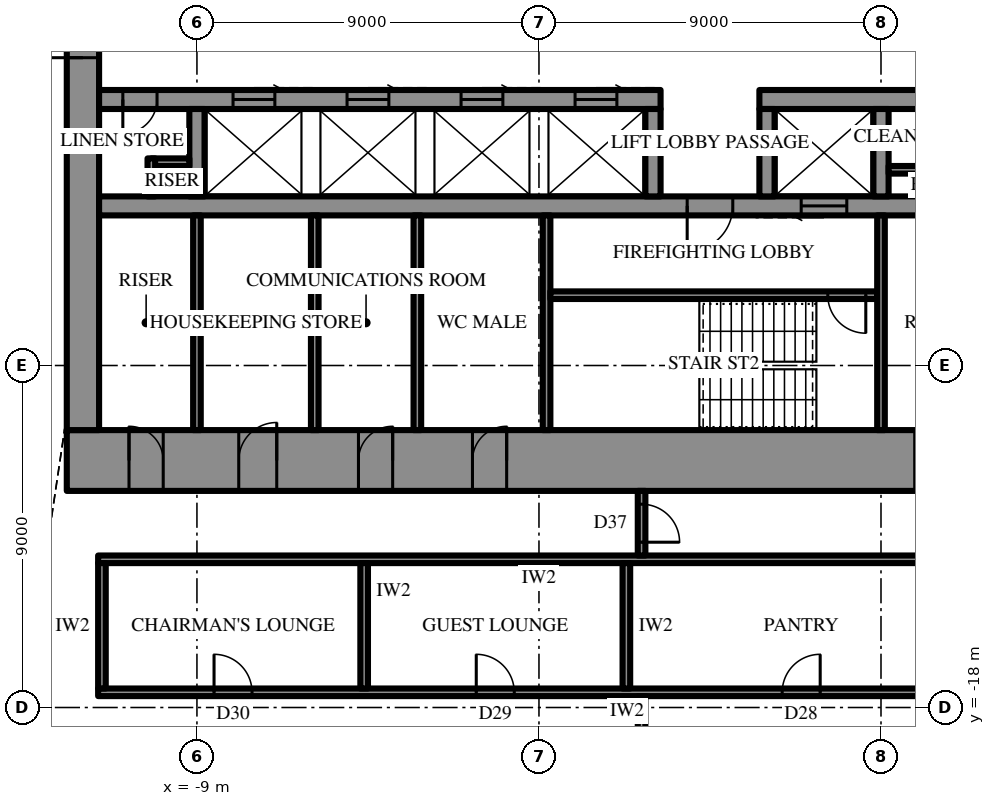
"""IFC4 building model, lengths in metres.
Left out: names, types, materials, properties, quantities, classifications, styles, units other than length and angle.
Written with IfcOpenShell. Run it as: python <this file> out.ifc"""

import sys

from ifc_helpers import new_model, si_unit, direction, frame, frame_2d, origin, place, context, subcontext, project, spatial, rectangle, extrude, element, fill, save


model = new_model("IFC4")
c1 = context("Model", 3, precision=1e-05, world=origin(), true_north=direction((0.0, 1.0)))
c2 = subcontext(c1, "Body", "Model", "MODEL_VIEW")
j1 = project(units=[si_unit("LENGTHUNIT", "METRE"), si_unit("PLANEANGLEUNIT", "RADIAN")], contexts=[c1])
p1 = place(None, origin())
s1 = spatial("IfcSite", under=j1, at=p1, CompositionType="ELEMENT")
p2 = place(p1, origin())
s2 = spatial("IfcBuilding", under=s1, at=p2, CompositionType="ELEMENT")
p3 = place(p2, frame((0.0, 0.0, 378.7)))
s3 = spatial("IfcBuildingStorey", under=s2, at=p3, CompositionType="ELEMENT", Elevation=378.7)
p4 = place(p3, frame((12.425, -11.5, 0.0), z_axis=(0.0, 0.0, 1.0), x_axis=(-1.0, 0.0, 0.0)))
e1 = element("IfcWall", 1, at=p4, inside=s3, PredefinedType="SHEAR", context=c2, shape_type="SweptSolid", body=[
    extrude(rectangle(XDim=24.85, YDim=1.6, at=frame_2d((12.425, 0.0))), origin(), (0.0, 0.0, 1.0), 4.2),
])
p5 = place(p4, frame((13.275, 0.0, 0.0)))
e2 = element("IfcOpeningElement", 2, at=p5, cuts=e1, PredefinedType="OPENING", context=c2, shape_type="SweptSolid", body=[
    extrude(rectangle(XDim=0.9, YDim=2.2, at=frame_2d((0.45, 1.1))), frame((0.0, 0.81, 0.0), z_axis=(0.0, -1.0, 0.0), x_axis=(1.0, 0.0, 0.0)), (0.0, 0.0, 1.0), 1.62),
])
p6 = place(p4, frame((16.275, 0.0, 0.0)))
e3 = element("IfcOpeningElement", 3, at=p6, cuts=e1, PredefinedType="OPENING", context=c2, shape_type="SweptSolid", body=[
    extrude(rectangle(XDim=0.9, YDim=2.2, at=frame_2d((0.45, 1.1))), frame((0.0, 0.81, 0.0), z_axis=(0.0, -1.0, 0.0), x_axis=(1.0, 0.0, 0.0)), (0.0, 0.0, 1.0), 1.62),
])
p7 = place(p4, frame((19.325, 0.0, 0.0)))
e4 = element("IfcOpeningElement", 4, at=p7, cuts=e1, PredefinedType="OPENING", context=c2, shape_type="SweptSolid", body=[
    extrude(rectangle(XDim=1.0, YDim=2.2, at=frame_2d((0.5, 1.1))), frame((0.0, 0.81, 0.0), z_axis=(0.0, -1.0, 0.0), x_axis=(1.0, 0.0, 0.0)), (0.0, 0.0, 1.0), 1.62),
])
p8 = place(p4, frame((1.637, 0.0, 0.0)))
e5 = element("IfcOpeningElement", 5, at=p8, cuts=e1, PredefinedType="OPENING", context=c2, shape_type="SweptSolid", body=[
    extrude(rectangle(XDim=0.9, YDim=2.2, at=frame_2d((0.45, 1.1))), frame((0.0, 0.81, 0.0), z_axis=(0.0, -1.0, 0.0), x_axis=(1.0, 0.0, 0.0)), (0.0, 0.0, 1.0), 1.62),
])
p9 = place(p4, frame((22.312, 0.0, 0.0)))
e6 = element("IfcOpeningElement", 6, at=p9, cuts=e1, PredefinedType="OPENING", context=c2, shape_type="SweptSolid", body=[
    extrude(rectangle(XDim=0.9, YDim=2.2, at=frame_2d((0.45, 1.1))), frame((0.0, 0.81, 0.0), z_axis=(0.0, -1.0, 0.0), x_axis=(1.0, 0.0, 0.0)), (0.0, 0.0, 1.0), 1.62),
])
p10 = place(p3, frame((-12.0, 10.7, 0.0), z_axis=(0.0, 0.0, 1.0), x_axis=(0.0, -1.0, 0.0)))
e7 = element("IfcWall", 7, at=p10, inside=s3, PredefinedType="SHEAR", context=c2, shape_type="SweptSolid", body=[
    extrude(rectangle(XDim=21.4, YDim=0.85, at=frame_2d((10.7, 0.0))), origin(), (0.0, 0.0, 1.0), 4.2),
])
p11 = place(p10, frame((9.8, 0.0, 0.0)))
e8 = element("IfcOpeningElement", 8, at=p11, cuts=e7, PredefinedType="OPENING", context=c2, shape_type="SweptSolid", body=[
    extrude(rectangle(XDim=1.8, YDim=2.4, at=frame_2d((0.9, 1.2))), frame((0.0, 0.435, 0.0), z_axis=(0.0, -1.0, 0.0), x_axis=(1.0, 0.0, 0.0)), (0.0, 0.0, 1.0), 0.87),
])
p12 = place(p3, frame((11.575, -2.0, 0.0), z_axis=(0.0, 0.0, 1.0), x_axis=(-1.0, 0.0, 0.0)))
e9 = element("IfcWall", 9, at=p12, inside=s3, PredefinedType="SHEAR", context=c2, shape_type="SweptSolid", body=[
    extrude(rectangle(XDim=5.775, YDim=0.5, at=frame_2d((2.887, 0.0))), origin(), (0.0, 0.0, 1.0), 4.2),
])
p13 = place(p12, frame((0.625, 0.0, 0.0)))
e10 = element("IfcOpeningElement", 10, at=p13, cuts=e9, PredefinedType="OPENING", context=c2, shape_type="SweptSolid", body=[
    extrude(rectangle(XDim=0.9, YDim=2.2, at=frame_2d((0.45, 1.1))), frame((0.0, 0.26, 0.0), z_axis=(0.0, -1.0, 0.0), x_axis=(1.0, 0.0, 0.0)), (0.0, 0.0, 1.0), 0.52),
])
p14 = place(p3, frame((3.2, -2.0, 0.0), z_axis=(0.0, 0.0, 1.0), x_axis=(-1.0, 0.0, 0.0)))
e11 = element("IfcWall", 11, at=p14, inside=s3, PredefinedType="SHEAR", context=c2, shape_type="SweptSolid", body=[
    extrude(rectangle(XDim=14.775, YDim=0.5, at=frame_2d((7.387, 0.0))), origin(), (0.0, 0.0, 1.0), 4.2),
])
p15 = place(p14, frame((13.25, 0.0, 0.0)))
e12 = element("IfcOpeningElement", 12, at=p15, cuts=e11, PredefinedType="OPENING", context=c2, shape_type="SweptSolid", body=[
    extrude(rectangle(XDim=0.9, YDim=2.2, at=frame_2d((0.45, 1.1))), frame((0.0, 0.26, 0.0), z_axis=(0.0, -1.0, 0.0), x_axis=(1.0, 0.0, 0.0)), (0.0, 0.0, 1.0), 0.52),
])
p16 = place(p14, frame((1.15, 0.0, 0.0)))
e13 = element("IfcOpeningElement", 13, at=p16, cuts=e11, PredefinedType="OPENING", context=c2, shape_type="SweptSolid", body=[
    extrude(rectangle(XDim=1.1, YDim=2.2, at=frame_2d((0.55, 1.1))), frame((0.0, 0.26, 0.0), z_axis=(0.0, -1.0, 0.0), x_axis=(1.0, 0.0, 0.0)), (0.0, 0.0, 1.0), 0.52),
])
p17 = place(p14, frame((4.15, 0.0, 0.0)))
e14 = element("IfcOpeningElement", 14, at=p17, cuts=e11, PredefinedType="OPENING", context=c2, shape_type="SweptSolid", body=[
    extrude(rectangle(XDim=1.1, YDim=2.2, at=frame_2d((0.55, 1.1))), frame((0.0, 0.26, 0.0), z_axis=(0.0, -1.0, 0.0), x_axis=(1.0, 0.0, 0.0)), (0.0, 0.0, 1.0), 0.52),
])
p18 = place(p14, frame((7.15, 0.0, 0.0)))
e15 = element("IfcOpeningElement", 15, at=p18, cuts=e11, PredefinedType="OPENING", context=c2, shape_type="SweptSolid", body=[
    extrude(rectangle(XDim=1.1, YDim=2.2, at=frame_2d((0.55, 1.1))), frame((0.0, 0.26, 0.0), z_axis=(0.0, -1.0, 0.0), x_axis=(1.0, 0.0, 0.0)), (0.0, 0.0, 1.0), 0.52),
])
p19 = place(p14, frame((10.15, 0.0, 0.0)))
e16 = element("IfcOpeningElement", 16, at=p19, cuts=e11, PredefinedType="OPENING", context=c2, shape_type="SweptSolid", body=[
    extrude(rectangle(XDim=1.1, YDim=2.2, at=frame_2d((0.55, 1.1))), frame((0.0, 0.26, 0.0), z_axis=(0.0, -1.0, 0.0), x_axis=(1.0, 0.0, 0.0)), (0.0, 0.0, 1.0), 0.52),
])
p20 = place(p3, frame((11.575, -4.8, 0.0), z_axis=(0.0, 0.0, 1.0), x_axis=(-1.0, 0.0, 0.0)))
e17 = element("IfcWall", 17, at=p20, inside=s3, PredefinedType="SHEAR", context=c2, shape_type="SweptSolid", body=[
    extrude(rectangle(XDim=23.15, YDim=0.5, at=frame_2d((11.575, 0.0))), origin(), (0.0, 0.0, 1.0), 4.2),
])
p21 = place(p20, frame((6.475, 0.0, 0.0)))
e18 = element("IfcOpeningElement", 18, at=p21, cuts=e17, PredefinedType="OPENING", context=c2, shape_type="SweptSolid", body=[
    extrude(rectangle(XDim=1.2, YDim=2.2, at=frame_2d((0.6, 1.1))), frame((0.0, 0.26, 0.0), z_axis=(0.0, -1.0, 0.0), x_axis=(1.0, 0.0, 0.0)), (0.0, 0.0, 1.0), 0.52),
])
p22 = place(p20, frame((3.475, 0.0, 0.0)))
e19 = element("IfcOpeningElement", 19, at=p22, cuts=e17, PredefinedType="OPENING", context=c2, shape_type="SweptSolid", body=[
    extrude(rectangle(XDim=1.2, YDim=2.2, at=frame_2d((0.6, 1.1))), frame((0.0, 0.26, 0.0), z_axis=(0.0, -1.0, 0.0), x_axis=(1.0, 0.0, 0.0)), (0.0, 0.0, 1.0), 0.52),
])
for number, where, z_axis, x_axis in (
    (20, (9.0, -2.25, 0.0), (0.0, 0.0, 1.0), (0.0, -1.0, 0.0)),
    (21, (6.0, -2.25, 0.0), (0.0, 0.0, 1.0), (0.0, -1.0, 0.0)),
    (22, (3.0, -2.25, 0.0), (0.0, 0.0, 1.0), (0.0, -1.0, 0.0)),
    (23, (-9.0, -2.25, 0.0), (0.0, 0.0, 1.0), (0.0, -1.0, 0.0)),
):
    element("IfcWall", number, at=place(p3, frame(where, z_axis=z_axis, x_axis=x_axis)), inside=s3, PredefinedType="SHEAR", context=c2, shape_type="SweptSolid", body=[
        extrude(rectangle(XDim=2.3, YDim=0.4, at=frame_2d((1.15, 0.0))), origin(), (0.0, 0.0, 1.0), 4.2),
    ])
p23 = place(p3, frame((0.2, -5.05, 0.0), z_axis=(0.0, 0.0, 1.0), x_axis=(0.0, -1.0, 0.0)))
e24 = element("IfcWall", 24, at=p23, inside=s3, PredefinedType="SHEAR", context=c2, shape_type="SweptSolid", body=[
    extrude(rectangle(XDim=5.65, YDim=0.2, at=frame_2d((2.825, 0.0))), origin(), (0.0, 0.0, 1.0), 4.2),
])
p24 = place(p3, frame((8.9, -7.15, 0.0), z_axis=(0.0, 0.0, 1.0), x_axis=(-1.0, 0.0, 0.0)))
e25 = element("IfcWall", 25, at=p24, inside=s3, PredefinedType="SHEAR", context=c2, shape_type="SweptSolid", body=[
    extrude(rectangle(XDim=8.6, YDim=0.2, at=frame_2d((4.3, 0.0))), origin(), (0.0, 0.0, 1.0), 4.2),
])
p25 = place(p24, frame((0.3, 0.0, 0.0)))
e26 = element("IfcOpeningElement", 26, at=p25, cuts=e25, PredefinedType="OPENING", context=c2, shape_type="SweptSolid", body=[
    extrude(rectangle(XDim=1.0, YDim=2.2, at=frame_2d((0.5, 1.1))), frame((0.0, 0.11, 0.0), z_axis=(0.0, -1.0, 0.0), x_axis=(1.0, 0.0, 0.0)), (0.0, 0.0, 1.0), 0.22),
])
for number, where, z_axis, x_axis in (
    (27, (9.0, -5.05, 0.0), (0.0, 0.0, 1.0), (0.0, -1.0, 0.0)),
    (28, (-9.0, -5.05, 0.0), (0.0, 0.0, 1.0), (0.0, -1.0, 0.0)),
    (29, (-3.2, -5.05, 0.0), (0.0, 0.0, 1.0), (0.0, -1.0, 0.0)),
    (30, (-5.9, -5.05, 0.0), (0.0, 0.0, 1.0), (0.0, -1.0, 0.0)),
):
    element("IfcWall", number, at=place(p3, frame(where, z_axis=z_axis, x_axis=x_axis)), inside=s3, PredefinedType="PARTITIONING", context=c2, shape_type="SweptSolid", body=[
        extrude(rectangle(XDim=5.65, YDim=0.2, at=frame_2d((2.825, 0.0))), origin(), (0.0, 0.0, 1.0), 4.0),
    ])
p26 = place(p3, frame((11.8, -3.85, 0.0), z_axis=(0.0, 0.0, 1.0), x_axis=(-1.0, 0.0, 0.0)))
e31 = element("IfcWall", 31, at=p26, inside=s3, PredefinedType="PARTITIONING", context=c2, shape_type="SweptSolid", body=[
    extrude(rectangle(XDim=2.6, YDim=0.2, at=frame_2d((1.3, 0.0))), origin(), (0.0, 0.0, 1.0), 4.0),
])
for number, where, z_axis, x_axis in (
    (32, (-9.2, -3.65, 0.0), (0.0, 0.0, 1.0), (-1.0, 0.0, 0.0)),
    (33, (-10.2, -3.55, 0.0), (0.0, 0.0, 1.0), (0.0, -1.0, 0.0)),
):
    element("IfcWall", number, at=place(p3, frame(where, z_axis=z_axis, x_axis=x_axis)), inside=s3, PredefinedType="PARTITIONING", context=c2, shape_type="SweptSolid", body=[
        extrude(rectangle(XDim=1.0, YDim=0.2, at=frame_2d((0.5, 0.0))), origin(), (0.0, 0.0, 1.0), 4.0),
    ])
p27 = place(p3, frame((11.6, -14.1, 0.0), z_axis=(0.0, 0.0, 1.0), x_axis=(-1.0, 0.0, 0.0)))
e34 = element("IfcWall", 34, at=p27, inside=s3, PredefinedType="PARTITIONING", context=c2, shape_type="SweptSolid", body=[
    extrude(rectangle(XDim=23.2, YDim=0.2, at=frame_2d((11.6, 0.0))), origin(), (0.0, 0.0, 1.0), 4.0),
])
p28 = place(p3, frame((11.6, -17.6, 0.0), z_axis=(0.0, 0.0, 1.0), x_axis=(-1.0, 0.0, 0.0)))
e35 = element("IfcWall", 35, at=p28, inside=s3, PredefinedType="PARTITIONING", context=c2, shape_type="SweptSolid", body=[
    extrude(rectangle(XDim=23.2, YDim=0.2, at=frame_2d((11.6, 0.0))), origin(), (0.0, 0.0, 1.0), 4.0),
])
p29 = place(p28, frame((4.2, 0.0, 0.0)))
e36 = element("IfcOpeningElement", 36, at=p29, cuts=e35, PredefinedType="OPENING", context=c2, shape_type="SweptSolid", body=[
    extrude(rectangle(XDim=1.0, YDim=2.2, at=frame_2d((0.5, 1.1))), frame((0.0, 0.11, 0.0), z_axis=(0.0, -1.0, 0.0), x_axis=(1.0, 0.0, 0.0)), (0.0, 0.0, 1.0), 0.22),
])
p30 = place(p28, frame((12.25, 0.0, 0.0)))
e37 = element("IfcOpeningElement", 37, at=p30, cuts=e35, PredefinedType="OPENING", context=c2, shape_type="SweptSolid", body=[
    extrude(rectangle(XDim=1.0, YDim=2.2, at=frame_2d((0.5, 1.1))), frame((0.0, 0.11, 0.0), z_axis=(0.0, -1.0, 0.0), x_axis=(1.0, 0.0, 0.0)), (0.0, 0.0, 1.0), 0.22),
])
p31 = place(p28, frame((19.15, 0.0, 0.0)))
e38 = element("IfcOpeningElement", 38, at=p31, cuts=e35, PredefinedType="OPENING", context=c2, shape_type="SweptSolid", body=[
    extrude(rectangle(XDim=1.0, YDim=2.2, at=frame_2d((0.5, 1.1))), frame((0.0, 0.11, 0.0), z_axis=(0.0, -1.0, 0.0), x_axis=(1.0, 0.0, 0.0)), (0.0, 0.0, 1.0), 0.22),
])
for number, where, z_axis, x_axis in (
    (39, (2.3, -14.2, 0.0), (0.0, 0.0, 1.0), (0.0, -1.0, 0.0)),
    (40, (-4.6, -14.2, 0.0), (0.0, 0.0, 1.0), (0.0, -1.0, 0.0)),
    (41, (-11.5, -14.2, 0.0), (0.0, 0.0, 1.0), (0.0, -1.0, 0.0)),
):
    element("IfcWall", number, at=place(p3, frame(where, z_axis=z_axis, x_axis=x_axis)), inside=s3, PredefinedType="PARTITIONING", context=c2, shape_type="SweptSolid", body=[
        extrude(rectangle(XDim=3.3, YDim=0.2, at=frame_2d((1.65, 0.0))), origin(), (0.0, 0.0, 1.0), 4.0),
    ])
p32 = place(p3, frame((2.7, -12.3, 0.0), z_axis=(0.0, 0.0, 1.0), x_axis=(0.0, -1.0, 0.0)))
e42 = element("IfcWall", 42, at=p32, inside=s3, PredefinedType="PARTITIONING", context=c2, shape_type="SweptSolid", body=[
    extrude(rectangle(XDim=1.7, YDim=0.2, at=frame_2d((0.85, 0.0))), origin(), (0.0, 0.0, 1.0), 4.0),
])
p33 = place(p32, frame((0.35, 0.0, 0.0)))
e43 = element("IfcOpeningElement", 43, at=p33, cuts=e42, PredefinedType="OPENING", context=c2, shape_type="SweptSolid", body=[
    extrude(rectangle(XDim=1.0, YDim=2.2, at=frame_2d((0.5, 1.1))), frame((0.0, 0.11, 0.0), z_axis=(0.0, -1.0, 0.0), x_axis=(1.0, 0.0, 0.0)), (0.0, 0.0, 1.0), 0.22),
])
p34 = place(p3, frame((2.7, -17.7, 0.0), z_axis=(0.0, 0.0, 1.0), x_axis=(0.0, -1.0, 0.0)))
e44 = element("IfcWall", 44, at=p34, inside=s3, PredefinedType="PARTITIONING", context=c2, shape_type="SweptSolid", body=[
    extrude(rectangle(XDim=8.85, YDim=0.2, at=frame_2d((4.425, 0.0))), origin(), (0.0, 0.0, 1.0), 4.0),
])
p35 = place(p11, frame((1.8, 0.0, 0.0), z_axis=(0.0, 0.0, 1.0), x_axis=(-1.0, 0.0, 0.0)))
e45 = element("IfcDoor", 45, at=p35, inside=s3, OperationType="DOUBLE_DOOR_SINGLE_SWING", PredefinedType="DOOR", context=c2, shape_type="SweptSolid", body=[
    extrude(rectangle(XDim=1.8, YDim=2.4, at=frame_2d((0.9, 1.2))), frame((0.0, 0.025, 0.0), z_axis=(0.0, -1.0, 0.0), x_axis=(1.0, 0.0, 0.0)), (0.0, 0.0, 1.0), 0.05),
])
fill(e8, e45)
p36 = place(p21, origin())
e46 = element("IfcDoor", 46, at=p36, inside=s3, OperationType="SINGLE_SWING_LEFT", PredefinedType="DOOR", context=c2, shape_type="SweptSolid", body=[
    extrude(rectangle(XDim=1.2, YDim=2.2, at=frame_2d((0.6, 1.1))), frame((0.0, 0.025, 0.0), z_axis=(0.0, -1.0, 0.0), x_axis=(1.0, 0.0, 0.0)), (0.0, 0.0, 1.0), 0.05),
])
fill(e18, e46)
p37 = place(p25, origin())
e47 = element("IfcDoor", 47, at=p37, inside=s3, OperationType="SINGLE_SWING_RIGHT", PredefinedType="DOOR", context=c2, shape_type="SweptSolid", body=[
    extrude(rectangle(XDim=1.0, YDim=2.2, at=frame_2d((0.5, 1.1))), frame((0.0, 0.025, 0.0), z_axis=(0.0, -1.0, 0.0), x_axis=(1.0, 0.0, 0.0)), (0.0, 0.0, 1.0), 0.05),
])
fill(e26, e47)
p38 = place(p5, frame((0.9, 0.0, 0.0), z_axis=(0.0, 0.0, 1.0), x_axis=(-1.0, 0.0, 0.0)))
e48 = element("IfcDoor", 48, at=p38, inside=s3, OperationType="SINGLE_SWING_LEFT", PredefinedType="DOOR", context=c2, shape_type="SweptSolid", body=[
    extrude(rectangle(XDim=0.9, YDim=2.2, at=frame_2d((0.45, 1.1))), frame((0.0, 0.025, 0.0), z_axis=(0.0, -1.0, 0.0), x_axis=(1.0, 0.0, 0.0)), (0.0, 0.0, 1.0), 0.05),
])
fill(e2, e48)
p39 = place(p6, frame((0.9, 0.0, 0.0), z_axis=(0.0, 0.0, 1.0), x_axis=(-1.0, 0.0, 0.0)))
e49 = element("IfcDoor", 49, at=p39, inside=s3, OperationType="SINGLE_SWING_LEFT", PredefinedType="DOOR", context=c2, shape_type="SweptSolid", body=[
    extrude(rectangle(XDim=0.9, YDim=2.2, at=frame_2d((0.45, 1.1))), frame((0.0, 0.025, 0.0), z_axis=(0.0, -1.0, 0.0), x_axis=(1.0, 0.0, 0.0)), (0.0, 0.0, 1.0), 0.05),
])
fill(e3, e49)
p40 = place(p7, frame((1.0, 0.0, 0.0), z_axis=(0.0, 0.0, 1.0), x_axis=(-1.0, 0.0, 0.0)))
e50 = element("IfcDoor", 50, at=p40, inside=s3, OperationType="SINGLE_SWING_LEFT", PredefinedType="DOOR", context=c2, shape_type="SweptSolid", body=[
    extrude(rectangle(XDim=1.0, YDim=2.2, at=frame_2d((0.5, 1.1))), frame((0.0, 0.025, 0.0), z_axis=(0.0, -1.0, 0.0), x_axis=(1.0, 0.0, 0.0)), (0.0, 0.0, 1.0), 0.05),
])
fill(e4, e50)
p41 = place(p8, frame((0.9, 0.0, 0.0), z_axis=(0.0, 0.0, 1.0), x_axis=(-1.0, 0.0, 0.0)))
e51 = element("IfcDoor", 51, at=p41, inside=s3, OperationType="SINGLE_SWING_LEFT", PredefinedType="DOOR", context=c2, shape_type="SweptSolid", body=[
    extrude(rectangle(XDim=0.9, YDim=2.2, at=frame_2d((0.45, 1.1))), frame((0.0, 0.025, 0.0), z_axis=(0.0, -1.0, 0.0), x_axis=(1.0, 0.0, 0.0)), (0.0, 0.0, 1.0), 0.05),
])
fill(e5, e51)
p42 = place(p9, frame((0.9, 0.0, 0.0), z_axis=(0.0, 0.0, 1.0), x_axis=(-1.0, 0.0, 0.0)))
e52 = element("IfcDoor", 52, at=p42, inside=s3, OperationType="SINGLE_SWING_RIGHT", PredefinedType="DOOR", context=c2, shape_type="SweptSolid", body=[
    extrude(rectangle(XDim=0.9, YDim=2.2, at=frame_2d((0.45, 1.1))), frame((0.0, 0.025, 0.0), z_axis=(0.0, -1.0, 0.0), x_axis=(1.0, 0.0, 0.0)), (0.0, 0.0, 1.0), 0.05),
])
fill(e6, e52)
p43 = place(p15, origin())
e53 = element("IfcDoor", 53, at=p43, inside=s3, OperationType="SINGLE_SWING_LEFT", PredefinedType="DOOR", context=c2, shape_type="SweptSolid", body=[
    extrude(rectangle(XDim=0.9, YDim=2.2, at=frame_2d((0.45, 1.1))), frame((0.0, 0.025, 0.0), z_axis=(0.0, -1.0, 0.0), x_axis=(1.0, 0.0, 0.0)), (0.0, 0.0, 1.0), 0.05),
])
fill(e12, e53)
p44 = place(p22, origin())
e54 = element("IfcDoor", 54, at=p44, inside=s3, OperationType="SLIDING_TO_LEFT", PredefinedType="DOOR", context=c2, shape_type="SweptSolid", body=[
    extrude(rectangle(XDim=1.2, YDim=2.2, at=frame_2d((0.6, 1.1))), frame((0.0, 0.025, 0.0), z_axis=(0.0, -1.0, 0.0), x_axis=(1.0, 0.0, 0.0)), (0.0, 0.0, 1.0), 0.05),
])
fill(e19, e54)
p45 = place(p16, frame((1.1, 0.0, 0.0), z_axis=(0.0, 0.0, 1.0), x_axis=(-1.0, 0.0, 0.0)))
e55 = element("IfcDoor", 55, at=p45, inside=s3, OperationType="SLIDING_TO_LEFT", PredefinedType="DOOR", context=c2, shape_type="SweptSolid", body=[
    extrude(rectangle(XDim=1.1, YDim=2.2, at=frame_2d((0.55, 1.1))), frame((0.0, 0.025, 0.0), z_axis=(0.0, -1.0, 0.0), x_axis=(1.0, 0.0, 0.0)), (0.0, 0.0, 1.0), 0.05),
])
fill(e13, e55)
p46 = place(p17, frame((1.1, 0.0, 0.0), z_axis=(0.0, 0.0, 1.0), x_axis=(-1.0, 0.0, 0.0)))
e56 = element("IfcDoor", 56, at=p46, inside=s3, OperationType="SLIDING_TO_LEFT", PredefinedType="DOOR", context=c2, shape_type="SweptSolid", body=[
    extrude(rectangle(XDim=1.1, YDim=2.2, at=frame_2d((0.55, 1.1))), frame((0.0, 0.025, 0.0), z_axis=(0.0, -1.0, 0.0), x_axis=(1.0, 0.0, 0.0)), (0.0, 0.0, 1.0), 0.05),
])
fill(e14, e56)
p47 = place(p18, frame((1.1, 0.0, 0.0), z_axis=(0.0, 0.0, 1.0), x_axis=(-1.0, 0.0, 0.0)))
e57 = element("IfcDoor", 57, at=p47, inside=s3, OperationType="SLIDING_TO_LEFT", PredefinedType="DOOR", context=c2, shape_type="SweptSolid", body=[
    extrude(rectangle(XDim=1.1, YDim=2.2, at=frame_2d((0.55, 1.1))), frame((0.0, 0.025, 0.0), z_axis=(0.0, -1.0, 0.0), x_axis=(1.0, 0.0, 0.0)), (0.0, 0.0, 1.0), 0.05),
])
fill(e15, e57)
p48 = place(p19, frame((1.1, 0.0, 0.0), z_axis=(0.0, 0.0, 1.0), x_axis=(-1.0, 0.0, 0.0)))
e58 = element("IfcDoor", 58, at=p48, inside=s3, OperationType="SLIDING_TO_LEFT", PredefinedType="DOOR", context=c2, shape_type="SweptSolid", body=[
    extrude(rectangle(XDim=1.1, YDim=2.2, at=frame_2d((0.55, 1.1))), frame((0.0, 0.025, 0.0), z_axis=(0.0, -1.0, 0.0), x_axis=(1.0, 0.0, 0.0)), (0.0, 0.0, 1.0), 0.05),
])
fill(e16, e58)
p49 = place(p29, frame((1.0, 0.0, 0.0), z_axis=(0.0, 0.0, 1.0), x_axis=(-1.0, 0.0, 0.0)))
e59 = element("IfcDoor", 59, at=p49, inside=s3, OperationType="SINGLE_SWING_LEFT", PredefinedType="DOOR", context=c2, shape_type="SweptSolid", body=[
    extrude(rectangle(XDim=1.0, YDim=2.2, at=frame_2d((0.5, 1.1))), frame((0.0, 0.025, 0.0), z_axis=(0.0, -1.0, 0.0), x_axis=(1.0, 0.0, 0.0)), (0.0, 0.0, 1.0), 0.05),
])
fill(e36, e59)
p50 = place(p30, frame((1.0, 0.0, 0.0), z_axis=(0.0, 0.0, 1.0), x_axis=(-1.0, 0.0, 0.0)))
e60 = element("IfcDoor", 60, at=p50, inside=s3, OperationType="SINGLE_SWING_RIGHT", PredefinedType="DOOR", context=c2, shape_type="SweptSolid", body=[
    extrude(rectangle(XDim=1.0, YDim=2.2, at=frame_2d((0.5, 1.1))), frame((0.0, 0.025, 0.0), z_axis=(0.0, -1.0, 0.0), x_axis=(1.0, 0.0, 0.0)), (0.0, 0.0, 1.0), 0.05),
])
fill(e37, e60)
p51 = place(p31, frame((1.0, 0.0, 0.0), z_axis=(0.0, 0.0, 1.0), x_axis=(-1.0, 0.0, 0.0)))
e61 = element("IfcDoor", 61, at=p51, inside=s3, OperationType="SINGLE_SWING_RIGHT", PredefinedType="DOOR", context=c2, shape_type="SweptSolid", body=[
    extrude(rectangle(XDim=1.0, YDim=2.2, at=frame_2d((0.5, 1.1))), frame((0.0, 0.025, 0.0), z_axis=(0.0, -1.0, 0.0), x_axis=(1.0, 0.0, 0.0)), (0.0, 0.0, 1.0), 0.05),
])
fill(e38, e61)
p52 = place(p33, origin())
e62 = element("IfcDoor", 62, at=p52, inside=s3, OperationType="SINGLE_SWING_LEFT", PredefinedType="DOOR", context=c2, shape_type="SweptSolid", body=[
    extrude(rectangle(XDim=1.0, YDim=2.2, at=frame_2d((0.5, 1.1))), frame((0.0, 0.025, 0.0), z_axis=(0.0, -1.0, 0.0), x_axis=(1.0, 0.0, 0.0)), (0.0, 0.0, 1.0), 0.05),
])
fill(e43, e62)
save(model, sys.argv[1])
